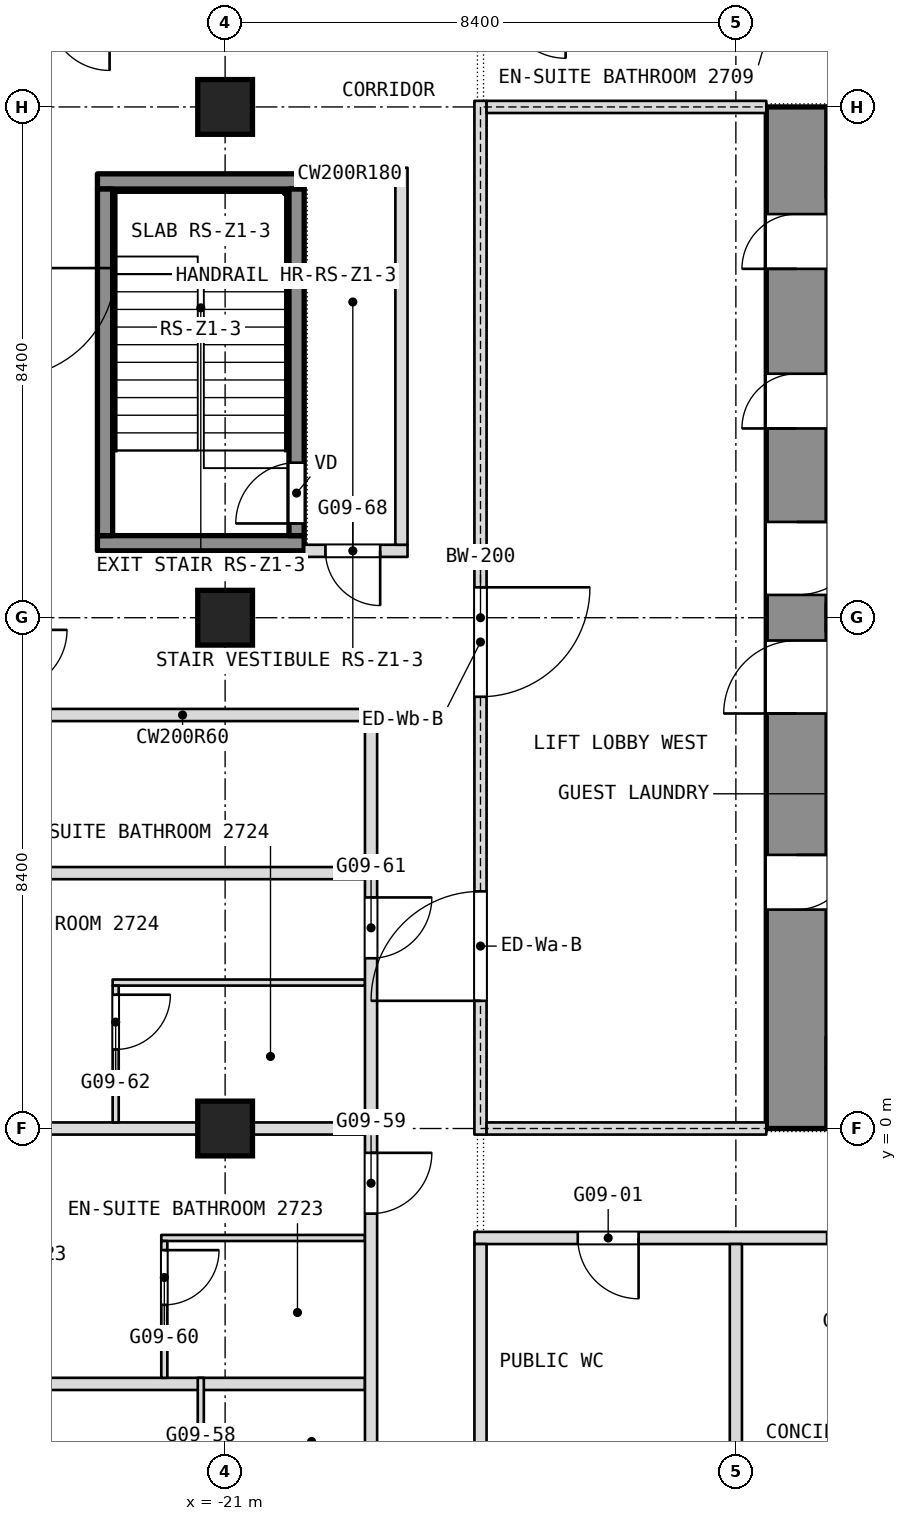
"""IFC4 building model, lengths in metres.
Left out: names, types, materials, properties, quantities, classifications, styles, units other than length and angle.
Written with IfcOpenShell. Run it as: python <this file> out.ifc"""

import sys

from ifc_helpers import new_model, si_unit, direction, frame, frame_2d, origin, origin_2d, place, context, subcontext, project, spatial, rectangle, extrude, element, fill, save


model = new_model("IFC4")
c1 = context("Model", 3, precision=1e-05, world=origin(), true_north=direction((0.0, 1.0)))
c2 = subcontext(c1, "Body", "Model", "MODEL_VIEW")
j1 = project(units=[si_unit("LENGTHUNIT", "METRE"), si_unit("PLANEANGLEUNIT", "RADIAN")], contexts=[c1])
p1 = place(None, origin())
s1 = spatial("IfcSite", under=j1, at=p1, CompositionType="ELEMENT")
p2 = place(p1, origin())
s2 = spatial("IfcBuilding", under=s1, at=p2, CompositionType="ELEMENT")
p3 = place(p2, frame((0.0, 0.0, 122.9)))
s3 = spatial("IfcBuildingStorey", under=s2, at=p3, CompositionType="ELEMENT", Elevation=122.9)
p4 = place(p3, frame((-11.6, 0.0, 0.0), z_axis=(0.0, 0.0, 1.0), x_axis=(0.0, 1.0, 0.0)))
e1 = element("IfcWall", 1, at=p4, inside=s3, PredefinedType="SHEAR", context=c2, shape_type="SweptSolid", body=[
    extrude(rectangle(XDim=16.8, YDim=1.0, at=frame_2d((8.4, 0.0))), origin(), (0.0, 0.0, 1.0), 3.6),
])
p5 = place(p4, frame((3.6, 0.0, 0.0)))
e2 = element("IfcOpeningElement", 2, at=p5, cuts=e1, PredefinedType="OPENING", context=c2, shape_type="SweptSolid", body=[
    extrude(rectangle(XDim=0.9, YDim=2.1, at=frame_2d((0.45, 1.05))), frame((0.0, 0.5, 0.0), z_axis=(0.0, -1.0, 0.0), x_axis=(1.0, 0.0, 0.0)), (0.0, 0.0, 1.0), 1.0),
])
p6 = place(p4, frame((6.825, 0.0, 0.0)))
e3 = element("IfcOpeningElement", 3, at=p6, cuts=e1, PredefinedType="OPENING", context=c2, shape_type="SweptSolid", body=[
    extrude(rectangle(XDim=1.2, YDim=2.1, at=frame_2d((0.6, 1.05))), frame((0.0, 0.5, 0.0), z_axis=(0.0, -1.0, 0.0), x_axis=(1.0, 0.0, 0.0)), (0.0, 0.0, 1.0), 1.0),
])
p7 = place(p4, frame((14.137, 0.0, 0.0)))
e4 = element("IfcOpeningElement", 4, at=p7, cuts=e1, PredefinedType="OPENING", context=c2, shape_type="SweptSolid", body=[
    extrude(rectangle(XDim=0.9, YDim=2.1, at=frame_2d((0.45, 1.05))), frame((0.0, 0.5, 0.0), z_axis=(0.0, -1.0, 0.0), x_axis=(1.0, 0.0, 0.0)), (0.0, 0.0, 1.0), 1.0),
])
p8 = place(p4, frame((11.512, 0.0, 0.0)))
e5 = element("IfcOpeningElement", 5, at=p8, cuts=e1, PredefinedType="OPENING", context=c2, shape_type="SweptSolid", body=[
    extrude(rectangle(XDim=0.9, YDim=2.1, at=frame_2d((0.45, 1.05))), frame((0.0, 0.5, 0.0), z_axis=(0.0, -1.0, 0.0), x_axis=(1.0, 0.0, 0.0)), (0.0, 0.0, 1.0), 1.0),
])
p9 = place(p4, frame((8.775, 0.0, 0.0)))
e6 = element("IfcOpeningElement", 6, at=p9, cuts=e1, PredefinedType="OPENING", context=c2, shape_type="SweptSolid", body=[
    extrude(rectangle(XDim=1.2, YDim=2.1, at=frame_2d((0.6, 1.05))), frame((0.0, 0.5, 0.0), z_axis=(0.0, -1.0, 0.0), x_axis=(1.0, 0.0, 0.0)), (0.0, 0.0, 1.0), 1.0),
])
p10 = place(p3, frame((-11.1, 8.4, 0.0), z_axis=(0.0, 0.0, 1.0), x_axis=(1.0, 0.0, 0.0)))
e7 = element("IfcWall", 7, at=p10, inside=s3, PredefinedType="SHEAR", context=c2, shape_type="SweptSolid", body=[
    extrude(rectangle(XDim=6.675, YDim=0.45, at=frame_2d((3.337, 0.0))), origin(), (0.0, 0.0, 1.0), 3.6),
])
for number, where, z_axis, x_axis in (
    (8, (-21.0, 0.0, 0.0), (0.0, 0.0, 1.0), (1.0, 0.0, 0.0)),
    (9, (-21.0, 8.4, 0.0), (0.0, 0.0, 1.0), (1.0, 0.0, 0.0)),
    (10, (-21.0, 16.8, 0.0), (0.0, 0.0, 1.0), (1.0, 0.0, 0.0)),
):
    element("IfcColumn", number, at=place(p3, frame(where, z_axis=z_axis, x_axis=x_axis)), inside=s3, PredefinedType="COLUMN", context=c2, shape_type="SweptSolid", body=[
        extrude(rectangle(XDim=0.9, YDim=0.9, at=origin_2d()), origin(), (0.0, 0.0, 1.0), 3.6),
    ])
p11 = place(p3, frame((-27.6, -4.2, 0.0), z_axis=(0.0, 0.0, 1.0), x_axis=(1.0, 0.0, 0.0)))
e11 = element("IfcWall", 11, at=p11, inside=s3, PredefinedType="PARTITIONING", context=c2, shape_type="SweptSolid", body=[
    extrude(rectangle(XDim=8.9, YDim=0.2, at=frame_2d((4.45, 0.0))), origin(), (0.0, 0.0, 1.0), 3.34),
])
p12 = place(p3, frame((-22.05, -1.8, 0.0), z_axis=(0.0, 0.0, 1.0), x_axis=(1.0, 0.0, 0.0)))
e12 = element("IfcWall", 12, at=p12, inside=s3, PredefinedType="PARTITIONING", context=c2, shape_type="SweptSolid", body=[
    extrude(rectangle(XDim=3.35, YDim=0.1, at=frame_2d((1.675, 0.0))), origin(), (0.0, 0.0, 1.0), 3.34),
])
p13 = place(p3, frame((-16.9, -1.8, 0.0), z_axis=(0.0, 0.0, 1.0), x_axis=(1.0, 0.0, 0.0)))
e13 = element("IfcWall", 13, at=p13, inside=s3, PredefinedType="PARTITIONING", context=c2, shape_type="SweptSolid", body=[
    extrude(rectangle(XDim=8.2, YDim=0.2, at=frame_2d((4.1, 0.0))), origin(), (0.0, 0.0, 1.0), 3.34),
])
p14 = place(p13, frame((1.7, 0.0, 0.0)))
e14 = element("IfcOpeningElement", 14, at=p14, cuts=e13, PredefinedType="OPENING", context=c2, shape_type="SweptSolid", body=[
    extrude(rectangle(XDim=1.0, YDim=2.1, at=frame_2d((0.5, 1.05))), frame((0.0, 0.1, 0.0), z_axis=(0.0, -1.0, 0.0), x_axis=(1.0, 0.0, 0.0)), (0.0, 0.0, 1.0), 0.2),
])
p15 = place(p13, frame((5.8, 0.0, 0.0)))
e15 = element("IfcOpeningElement", 15, at=p15, cuts=e13, PredefinedType="OPENING", context=c2, shape_type="SweptSolid", body=[
    extrude(rectangle(XDim=1.0, YDim=2.1, at=frame_2d((0.5, 1.05))), frame((0.0, 0.1, 0.0), z_axis=(0.0, -1.0, 0.0), x_axis=(1.0, 0.0, 0.0)), (0.0, 0.0, 1.0), 0.2),
])
p16 = place(p3, frame((-27.6, 0.0, 0.0), z_axis=(0.0, 0.0, 1.0), x_axis=(1.0, 0.0, 0.0)))
e16 = element("IfcWall", 16, at=p16, inside=s3, PredefinedType="PARTITIONING", context=c2, shape_type="SweptSolid", body=[
    extrude(rectangle(XDim=8.9, YDim=0.2, at=frame_2d((4.45, 0.0))), origin(), (0.0, 0.0, 1.0), 2.89),
])
p17 = place(p3, frame((-22.85, 2.4, 0.0), z_axis=(0.0, 0.0, 1.0), x_axis=(1.0, 0.0, 0.0)))
e17 = element("IfcWall", 17, at=p17, inside=s3, PredefinedType="PARTITIONING", context=c2, shape_type="SweptSolid", body=[
    extrude(rectangle(XDim=4.15, YDim=0.1, at=frame_2d((2.075, 0.0))), origin(), (0.0, 0.0, 1.0), 3.34),
])
p18 = place(p3, frame((-25.5, 4.2, 0.0), z_axis=(0.0, 0.0, 1.0), x_axis=(1.0, 0.0, 0.0)))
e18 = element("IfcWall", 18, at=p18, inside=s3, PredefinedType="PARTITIONING", context=c2, shape_type="SweptSolid", body=[
    extrude(rectangle(XDim=6.8, YDim=0.2, at=frame_2d((3.4, 0.0))), origin(), (0.0, 0.0, 1.0), 3.34),
])
p19 = place(p3, frame((-24.7, 6.8, 0.0), z_axis=(0.0, 0.0, 1.0), x_axis=(1.0, 0.0, 0.0)))
e19 = element("IfcWall", 19, at=p19, inside=s3, PredefinedType="PARTITIONING", context=c2, shape_type="SweptSolid", body=[
    extrude(rectangle(XDim=6.0, YDim=0.2, at=frame_2d((3.0, 0.0))), origin(), (0.0, 0.0, 1.0), 3.34),
])
p20 = place(p3, frame((-19.7, 9.5, 0.0), z_axis=(0.0, 0.0, 1.0), x_axis=(1.0, 0.0, 0.0)))
e20 = element("IfcWall", 20, at=p20, inside=s3, PredefinedType="PARTITIONING", context=c2, shape_type="SweptSolid", body=[
    extrude(rectangle(XDim=1.7, YDim=0.2, at=frame_2d((0.85, 0.0))), origin(), (0.0, 0.0, 1.0), 3.34),
])
p21 = place(p20, frame((0.35, 0.0, 0.0)))
e21 = element("IfcOpeningElement", 21, at=p21, cuts=e20, PredefinedType="OPENING", context=c2, shape_type="SweptSolid", body=[
    extrude(rectangle(XDim=0.9, YDim=2.1, at=frame_2d((0.45, 1.05))), frame((0.0, 0.1, 0.0), z_axis=(0.0, -1.0, 0.0), x_axis=(1.0, 0.0, 0.0)), (0.0, 0.0, 1.0), 0.2),
])
p22 = place(p3, frame((-12.6, -11.6, 0.0), z_axis=(0.0, 0.0, 1.0), x_axis=(0.0, 1.0, 0.0)))
e22 = element("IfcWall", 22, at=p22, inside=s3, PredefinedType="PARTITIONING", context=c2, shape_type="SweptSolid", body=[
    extrude(rectangle(XDim=9.7, YDim=0.2, at=frame_2d((4.85, 0.0))), origin(), (0.0, 0.0, 1.0), 3.34),
])
p23 = place(p3, frame((-19.7, 15.7, 0.0), z_axis=(0.0, 0.0, 1.0), x_axis=(1.0, 0.0, 0.0)))
e23 = element("IfcWall", 23, at=p23, inside=s3, PredefinedType="PARTITIONING", context=c2, shape_type="SweptSolid", body=[
    extrude(rectangle(XDim=1.5, YDim=0.2, at=frame_2d((0.75, 0.0))), origin(), (0.0, 0.0, 1.0), 3.34),
])
p24 = place(p3, frame((-16.8, -11.8, 0.0), z_axis=(0.0, 0.0, 1.0), x_axis=(0.0, 1.0, 0.0)))
e24 = element("IfcWall", 24, at=p24, inside=s3, PredefinedType="PARTITIONING", context=c2, shape_type="SweptSolid", body=[
    extrude(rectangle(XDim=9.9, YDim=0.2, at=frame_2d((4.95, 0.0))), origin(), (0.0, 0.0, 1.0), 3.34),
])
p25 = place(p3, frame((-18.1, 9.6, 0.0), z_axis=(0.0, 0.0, 1.0), x_axis=(0.0, 1.0, 0.0)))
e25 = element("IfcWall", 25, at=p25, inside=s3, PredefinedType="PARTITIONING", context=c2, shape_type="SweptSolid", body=[
    extrude(rectangle(XDim=6.2, YDim=0.2, at=frame_2d((3.1, 0.0))), origin(), (0.0, 0.0, 1.0), 3.34),
])
p26 = place(p3, frame((-18.6, -21.708, 0.0), z_axis=(0.0, 0.0, 1.0), x_axis=(0.0, 1.0, 0.0)))
e26 = element("IfcWall", 26, at=p26, inside=s3, PredefinedType="PARTITIONING", context=c2, shape_type="SweptSolid", body=[
    extrude(rectangle(XDim=28.608, YDim=0.2, at=frame_2d((14.304, 0.0))), origin(), (0.0, 0.0, 1.0), 3.34),
])
p27 = place(p26, frame((2.054, 0.0, 0.0)))
e27 = element("IfcOpeningElement", 27, at=p27, cuts=e26, PredefinedType="OPENING", context=c2, shape_type="SweptSolid", body=[
    extrude(rectangle(XDim=0.9, YDim=2.1, at=frame_2d((0.45, 1.05))), frame((0.0, 0.1, 0.0), z_axis=(0.0, -1.0, 0.0), x_axis=(1.0, 0.0, 0.0)), (0.0, 0.0, 1.0), 0.2),
])
p28 = place(p26, frame((8.208, 0.0, 0.0)))
e28 = element("IfcOpeningElement", 28, at=p28, cuts=e26, PredefinedType="OPENING", context=c2, shape_type="SweptSolid", body=[
    extrude(rectangle(XDim=1.8, YDim=2.1, at=frame_2d((0.9, 1.05))), frame((0.0, 0.1, 0.0), z_axis=(0.0, -1.0, 0.0), x_axis=(1.0, 0.0, 0.0)), (0.0, 0.0, 1.0), 0.2),
])
p29 = place(p26, frame((13.708, 0.0, 0.0)))
e29 = element("IfcOpeningElement", 29, at=p29, cuts=e26, PredefinedType="OPENING", context=c2, shape_type="SweptSolid", body=[
    extrude(rectangle(XDim=1.0, YDim=2.1, at=frame_2d((0.5, 1.05))), frame((0.0, 0.1, 0.0), z_axis=(0.0, -1.0, 0.0), x_axis=(1.0, 0.0, 0.0)), (0.0, 0.0, 1.0), 0.2),
])
p30 = place(p26, frame((20.308, 0.0, 0.0)))
e30 = element("IfcOpeningElement", 30, at=p30, cuts=e26, PredefinedType="OPENING", context=c2, shape_type="SweptSolid", body=[
    extrude(rectangle(XDim=1.0, YDim=2.1, at=frame_2d((0.5, 1.05))), frame((0.0, 0.1, 0.0), z_axis=(0.0, -1.0, 0.0), x_axis=(1.0, 0.0, 0.0)), (0.0, 0.0, 1.0), 0.2),
])
p31 = place(p26, frame((24.508, 0.0, 0.0)))
e31 = element("IfcOpeningElement", 31, at=p31, cuts=e26, PredefinedType="OPENING", context=c2, shape_type="SweptSolid", body=[
    extrude(rectangle(XDim=1.0, YDim=2.1, at=frame_2d((0.5, 1.05))), frame((0.0, 0.1, 0.0), z_axis=(0.0, -1.0, 0.0), x_axis=(1.0, 0.0, 0.0)), (0.0, 0.0, 1.0), 0.2),
])
p32 = place(p3, frame((-21.4, -6.65, 0.0), z_axis=(0.0, 0.0, 1.0), x_axis=(0.0, 1.0, 0.0)))
e32 = element("IfcWall", 32, at=p32, inside=s3, PredefinedType="PARTITIONING", context=c2, shape_type="SweptSolid", body=[
    extrude(rectangle(XDim=2.55, YDim=0.1, at=frame_2d((1.275, 0.0))), origin(), (0.0, 0.0, 1.0), 3.34),
])
p33 = place(p32, frame((0.15, 0.0, 0.0)))
e33 = element("IfcOpeningElement", 33, at=p33, cuts=e32, PredefinedType="OPENING", context=c2, shape_type="SweptSolid", body=[
    extrude(rectangle(XDim=0.9, YDim=2.1, at=frame_2d((0.45, 1.05))), frame((0.0, 0.05, 0.0), z_axis=(0.0, -1.0, 0.0), x_axis=(1.0, 0.0, 0.0)), (0.0, 0.0, 1.0), 0.1),
])
p34 = place(p3, frame((-22.0, -4.1, 0.0), z_axis=(0.0, 0.0, 1.0), x_axis=(0.0, 1.0, 0.0)))
e34 = element("IfcWall", 34, at=p34, inside=s3, PredefinedType="PARTITIONING", context=c2, shape_type="SweptSolid", body=[
    extrude(rectangle(XDim=2.25, YDim=0.1, at=frame_2d((1.125, 0.0))), origin(), (0.0, 0.0, 1.0), 3.34),
])
p35 = place(p34, frame((1.2, 0.0, 0.0)))
e35 = element("IfcOpeningElement", 35, at=p35, cuts=e34, PredefinedType="OPENING", context=c2, shape_type="SweptSolid", body=[
    extrude(rectangle(XDim=0.9, YDim=2.1, at=frame_2d((0.45, 1.05))), frame((0.0, 0.05, 0.0), z_axis=(0.0, -1.0, 0.0), x_axis=(1.0, 0.0, 0.0)), (0.0, 0.0, 1.0), 0.1),
])
p36 = place(p3, frame((-22.8, 0.1, 0.0), z_axis=(0.0, 0.0, 1.0), x_axis=(0.0, 1.0, 0.0)))
e36 = element("IfcWall", 36, at=p36, inside=s3, PredefinedType="PARTITIONING", context=c2, shape_type="SweptSolid", body=[
    extrude(rectangle(XDim=2.25, YDim=0.1, at=frame_2d((1.125, 0.0))), origin(), (0.0, 0.0, 1.0), 3.34),
])
p37 = place(p36, frame((1.2, 0.0, 0.0)))
e37 = element("IfcOpeningElement", 37, at=p37, cuts=e36, PredefinedType="OPENING", context=c2, shape_type="SweptSolid", body=[
    extrude(rectangle(XDim=0.9, YDim=2.1, at=frame_2d((0.45, 1.05))), frame((0.0, 0.05, 0.0), z_axis=(0.0, -1.0, 0.0), x_axis=(1.0, 0.0, 0.0)), (0.0, 0.0, 1.0), 0.1),
])
p38 = place(p3, frame((-16.8, -0.1, 0.0), z_axis=(0.0, 0.0, 1.0), x_axis=(0.0, 1.0, 0.0)))
e38 = element("IfcWall", 38, at=p38, inside=s3, PredefinedType="PARTITIONING", context=c2, shape_type="SweptSolid", body=[
    extrude(rectangle(XDim=17.0, YDim=0.2, at=frame_2d((8.5, 0.0))), origin(), (0.0, 0.0, 1.0), 3.34),
])
p39 = place(p38, frame((2.2, 0.0, 0.0)))
e39 = element("IfcOpeningElement", 39, at=p39, cuts=e38, PredefinedType="OPENING", context=c2, shape_type="SweptSolid", body=[
    extrude(rectangle(XDim=1.8, YDim=2.1, at=frame_2d((0.9, 1.05))), frame((0.0, 0.1, 0.0), z_axis=(0.0, -1.0, 0.0), x_axis=(1.0, 0.0, 0.0)), (0.0, 0.0, 1.0), 0.2),
])
p40 = place(p38, frame((7.2, 0.0, 0.0)))
e40 = element("IfcOpeningElement", 40, at=p40, cuts=e38, PredefinedType="OPENING", context=c2, shape_type="SweptSolid", body=[
    extrude(rectangle(XDim=1.8, YDim=2.1, at=frame_2d((0.9, 1.05))), frame((0.0, 0.1, 0.0), z_axis=(0.0, -1.0, 0.0), x_axis=(1.0, 0.0, 0.0)), (0.0, 0.0, 1.0), 0.2),
])
for number, where, z_axis, x_axis in (
    (41, (-16.7, 0.0, 0.0), (0.0, 0.0, 1.0), (1.0, 0.0, 0.0)),
    (42, (-16.7, 16.8, 0.0), (0.0, 0.0, 1.0), (1.0, 0.0, 0.0)),
):
    element("IfcWall", number, at=place(p3, frame(where, z_axis=z_axis, x_axis=x_axis)), inside=s3, PredefinedType="PARTITIONING", context=c2, shape_type="SweptSolid", body=[
        extrude(rectangle(XDim=4.6, YDim=0.2, at=frame_2d((2.3, 0.0))), origin(), (0.0, 0.0, 1.0), 2.89),
    ])
for number, where, z_axis, x_axis in (
    (43, (-23.1, 9.625, 0.1), (0.0, 0.0, 1.0), (1.0, 0.0, 0.0)),
    (44, (-23.1, 15.575, 0.1), (0.0, 0.0, 1.0), (1.0, 0.0, 0.0)),
):
    element("IfcWall", number, at=place(p3, frame(where, z_axis=z_axis, x_axis=x_axis)), inside=s3, PredefinedType="SHEAR", context=c2, shape_type="SweptSolid", body=[
        extrude(rectangle(XDim=3.4, YDim=0.25, at=frame_2d((1.7, 0.0))), origin(), (0.0, 0.0, 1.0), 3.6),
    ])
p41 = place(p3, frame((-22.975, 9.75, 0.1), z_axis=(0.0, 0.0, 1.0), x_axis=(0.0, 1.0, 0.0)))
e45 = element("IfcWall", 45, at=p41, inside=s3, PredefinedType="SHEAR", context=c2, shape_type="SweptSolid", body=[
    extrude(rectangle(XDim=5.7, YDim=0.25, at=frame_2d((2.85, 0.0))), origin(), (0.0, 0.0, 1.0), 3.6),
])
p42 = place(p3, frame((-19.825, 9.75, 0.1), z_axis=(0.0, 0.0, 1.0), x_axis=(0.0, 1.0, 0.0)))
e46 = element("IfcWall", 46, at=p42, inside=s3, PredefinedType="SHEAR", context=c2, shape_type="SweptSolid", body=[
    extrude(rectangle(XDim=5.7, YDim=0.25, at=frame_2d((2.85, 0.0))), origin(), (0.0, 0.0, 1.0), 3.6),
])
p43 = place(p42, frame((0.2, 0.0, 0.0)))
e47 = element("IfcOpeningElement", 47, at=p43, cuts=e46, PredefinedType="OPENING", context=c2, shape_type="SweptSolid", body=[
    extrude(rectangle(XDim=1.0, YDim=2.1, at=frame_2d((0.5, 1.05))), frame((0.0, 0.125, 0.0), z_axis=(0.0, -1.0, 0.0), x_axis=(1.0, 0.0, 0.0)), (0.0, 0.0, 1.0), 0.25),
])
p44 = place(p14, origin())
e48 = element("IfcDoor", 48, at=p44, inside=s3, OperationType="SINGLE_SWING_LEFT", PredefinedType="DOOR", context=c2, shape_type="SweptSolid", body=[
    extrude(rectangle(XDim=1.0, YDim=2.1, at=frame_2d((0.5, 1.05))), frame((0.0, 0.025, 0.0), z_axis=(0.0, -1.0, 0.0), x_axis=(1.0, 0.0, 0.0)), (0.0, 0.0, 1.0), 0.05),
])
fill(e14, e48)
p45 = place(p21, origin())
e49 = element("IfcDoor", 49, at=p45, inside=s3, OperationType="SINGLE_SWING_RIGHT", PredefinedType="DOOR", context=c2, shape_type="SweptSolid", body=[
    extrude(rectangle(XDim=0.9, YDim=2.1, at=frame_2d((0.45, 1.05))), frame((0.0, 0.025, 0.0), z_axis=(0.0, -1.0, 0.0), x_axis=(1.0, 0.0, 0.0)), (0.0, 0.0, 1.0), 0.05),
])
fill(e21, e49)
p46 = place(p30, origin())
e50 = element("IfcDoor", 50, at=p46, inside=s3, OperationType="SINGLE_SWING_RIGHT", PredefinedType="DOOR", context=c2, shape_type="SweptSolid", body=[
    extrude(rectangle(XDim=1.0, YDim=2.1, at=frame_2d((0.5, 1.05))), frame((0.0, 0.025, 0.0), z_axis=(0.0, -1.0, 0.0), x_axis=(1.0, 0.0, 0.0)), (0.0, 0.0, 1.0), 0.05),
])
fill(e30, e50)
p47 = place(p31, origin())
e51 = element("IfcDoor", 51, at=p47, inside=s3, OperationType="SINGLE_SWING_RIGHT", PredefinedType="DOOR", context=c2, shape_type="SweptSolid", body=[
    extrude(rectangle(XDim=1.0, YDim=2.1, at=frame_2d((0.5, 1.05))), frame((0.0, 0.025, 0.0), z_axis=(0.0, -1.0, 0.0), x_axis=(1.0, 0.0, 0.0)), (0.0, 0.0, 1.0), 0.05),
])
fill(e31, e51)
p48 = place(p35, origin())
e52 = element("IfcDoor", 52, at=p48, inside=s3, OperationType="SINGLE_SWING_LEFT", PredefinedType="DOOR", context=c2, shape_type="SweptSolid", body=[
    extrude(rectangle(XDim=0.9, YDim=2.1, at=frame_2d((0.45, 1.05))), frame((0.0, 0.025, 0.0), z_axis=(0.0, -1.0, 0.0), x_axis=(1.0, 0.0, 0.0)), (0.0, 0.0, 1.0), 0.05),
])
fill(e35, e52)
p49 = place(p37, origin())
e53 = element("IfcDoor", 53, at=p49, inside=s3, OperationType="SINGLE_SWING_LEFT", PredefinedType="DOOR", context=c2, shape_type="SweptSolid", body=[
    extrude(rectangle(XDim=0.9, YDim=2.1, at=frame_2d((0.45, 1.05))), frame((0.0, 0.025, 0.0), z_axis=(0.0, -1.0, 0.0), x_axis=(1.0, 0.0, 0.0)), (0.0, 0.0, 1.0), 0.05),
])
fill(e37, e53)
p50 = place(p43, origin())
e54 = element("IfcDoor", 54, at=p50, inside=s3, OperationType="SINGLE_SWING_LEFT", PredefinedType="DOOR", context=c2, shape_type="SweptSolid", body=[
    extrude(rectangle(XDim=1.0, YDim=2.1, at=frame_2d((0.5, 1.05))), frame((0.0, 0.025, 0.0), z_axis=(0.0, -1.0, 0.0), x_axis=(1.0, 0.0, 0.0)), (0.0, 0.0, 1.0), 0.05),
])
fill(e47, e54)
p51 = place(p5, origin())
e55 = element("IfcDoor", 55, at=p51, inside=s3, OperationType="SINGLE_SWING_LEFT", PredefinedType="DOOR", context=c2, shape_type="SweptSolid", body=[
    extrude(rectangle(XDim=0.9, YDim=2.1, at=frame_2d((0.45, 1.05))), frame((0.0, 0.025, 0.0), z_axis=(0.0, -1.0, 0.0), x_axis=(1.0, 0.0, 0.0)), (0.0, 0.0, 1.0), 0.05),
])
fill(e2, e55)
p52 = place(p6, origin())
e56 = element("IfcDoor", 56, at=p52, inside=s3, OperationType="SINGLE_SWING_LEFT", PredefinedType="DOOR", context=c2, shape_type="SweptSolid", body=[
    extrude(rectangle(XDim=1.2, YDim=2.1, at=frame_2d((0.6, 1.05))), frame((0.0, 0.025, 0.0), z_axis=(0.0, -1.0, 0.0), x_axis=(1.0, 0.0, 0.0)), (0.0, 0.0, 1.0), 0.05),
])
fill(e3, e56)
p53 = place(p7, origin())
e57 = element("IfcDoor", 57, at=p53, inside=s3, OperationType="SINGLE_SWING_LEFT", PredefinedType="DOOR", context=c2, shape_type="SweptSolid", body=[
    extrude(rectangle(XDim=0.9, YDim=2.1, at=frame_2d((0.45, 1.05))), frame((0.0, 0.025, 0.0), z_axis=(0.0, -1.0, 0.0), x_axis=(1.0, 0.0, 0.0)), (0.0, 0.0, 1.0), 0.05),
])
fill(e4, e57)
p54 = place(p8, origin())
e58 = element("IfcDoor", 58, at=p54, inside=s3, OperationType="SINGLE_SWING_LEFT", PredefinedType="DOOR", context=c2, shape_type="SweptSolid", body=[
    extrude(rectangle(XDim=0.9, YDim=2.1, at=frame_2d((0.45, 1.05))), frame((0.0, 0.025, 0.0), z_axis=(0.0, -1.0, 0.0), x_axis=(1.0, 0.0, 0.0)), (0.0, 0.0, 1.0), 0.05),
])
fill(e5, e58)
p55 = place(p9, origin())
e59 = element("IfcDoor", 59, at=p55, inside=s3, OperationType="SINGLE_SWING_LEFT", PredefinedType="DOOR", context=c2, shape_type="SweptSolid", body=[
    extrude(rectangle(XDim=1.2, YDim=2.1, at=frame_2d((0.6, 1.05))), frame((0.0, 0.025, 0.0), z_axis=(0.0, -1.0, 0.0), x_axis=(1.0, 0.0, 0.0)), (0.0, 0.0, 1.0), 0.05),
])
fill(e6, e59)
p56 = place(p39, origin())
e60 = element("IfcDoor", 60, at=p56, inside=s3, OperationType="DOUBLE_DOOR_SINGLE_SWING", PredefinedType="DOOR", context=c2, shape_type="SweptSolid", body=[
    extrude(rectangle(XDim=1.8, YDim=2.1, at=frame_2d((0.9, 1.05))), frame((0.0, 0.025, 0.0), z_axis=(0.0, -1.0, 0.0), x_axis=(1.0, 0.0, 0.0)), (0.0, 0.0, 1.0), 0.05),
])
fill(e39, e60)
p57 = place(p40, origin())
e61 = element("IfcDoor", 61, at=p57, inside=s3, OperationType="DOUBLE_DOOR_SINGLE_SWING", PredefinedType="DOOR", context=c2, shape_type="SweptSolid", body=[
    extrude(rectangle(XDim=1.8, YDim=2.1, at=frame_2d((0.9, 1.05))), frame((0.0, 0.025, 0.0), z_axis=(0.0, -1.0, 0.0), x_axis=(1.0, 0.0, 0.0)), (0.0, 0.0, 1.0), 0.05),
])
fill(e40, e61)
save(model, sys.argv[1])
